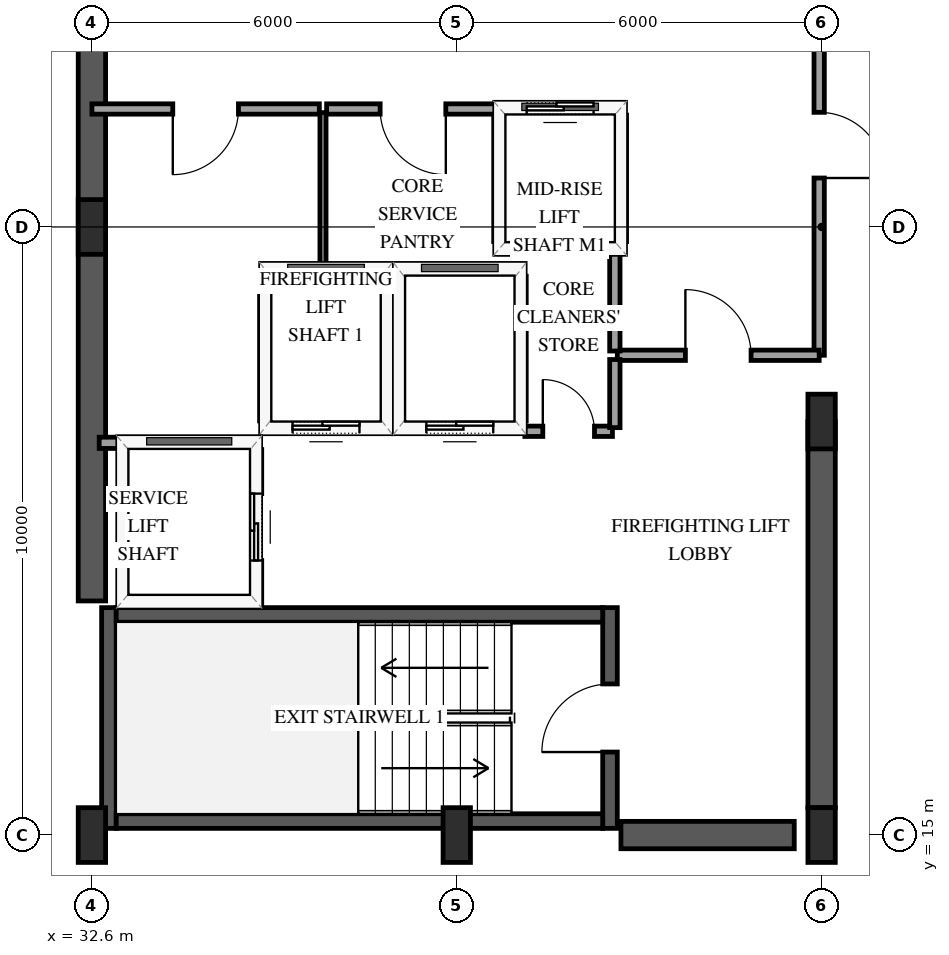
"""IFC4 building model, lengths in metres.
Left out: names, types, materials, properties, quantities, classifications, styles, units other than length and angle.
Written with IfcOpenShell. Run it as: python <this file> out.ifc"""

import sys

from ifc_helpers import new_model, si_unit, direction, frame, frame_2d, origin, origin_2d, place, context, subcontext, project, spatial, rectangle, extrude, element, fill, save


model = new_model("IFC4")
c1 = context("Model", 3, precision=1e-05, world=origin(), true_north=direction((0.0, 1.0)))
c2 = subcontext(c1, "Body", "Model", "MODEL_VIEW")
j1 = project(units=[si_unit("LENGTHUNIT", "METRE"), si_unit("PLANEANGLEUNIT", "RADIAN")], contexts=[c1])
p1 = place(None, origin())
s1 = spatial("IfcSite", under=j1, at=p1, CompositionType="ELEMENT")
p2 = place(p1, origin())
s2 = spatial("IfcBuilding", under=s1, at=p2, CompositionType="ELEMENT")
p3 = place(p2, frame((0.0, 0.0, 194.2)))
s3 = spatial("IfcBuildingStorey", under=s2, at=p3, CompositionType="ELEMENT", Elevation=194.2)
p4 = place(p3, frame((32.88, 15.11, 0.0), z_axis=(0.0, 0.0, 1.0), x_axis=(0.0, 1.0, 0.0)))
e1 = element("IfcWall", 1, at=p4, inside=s3, PredefinedType="SHEAR", context=c2, shape_type="SweptSolid", body=[
    extrude(rectangle(XDim=3.63, YDim=0.24, at=frame_2d((1.815, 0.0))), origin(), (0.0, 0.0, 1.0), 3.6),
])
p5 = place(p3, frame((41.12, 15.11, 0.0), z_axis=(0.0, 0.0, 1.0), x_axis=(0.0, 1.0, 0.0)))
e2 = element("IfcWall", 2, at=p5, inside=s3, PredefinedType="SHEAR", context=c2, shape_type="SweptSolid", body=[
    extrude(rectangle(XDim=3.63, YDim=0.24, at=frame_2d((1.815, 0.0))), origin(), (0.0, 0.0, 1.0), 3.6),
])
p6 = place(p5, frame((1.255, 0.0, 0.0)))
e3 = element("IfcOpeningElement", 3, at=p6, cuts=e2, PredefinedType="OPENING", context=c2, shape_type="SweptSolid", body=[
    extrude(rectangle(XDim=1.12, YDim=2.15, at=frame_2d((0.56, 1.075))), frame((0.0, 0.13, 0.0), z_axis=(0.0, -1.0, 0.0), x_axis=(1.0, 0.0, 0.0)), (0.0, 0.0, 1.0), 0.26),
])
for number, where, z_axis, x_axis in (
    (4, (33.0, 15.23, 0.0), (0.0, 0.0, 1.0), (1.0, 0.0, 0.0)),
    (5, (33.0, 18.62, 0.0), (0.0, 0.0, 1.0), (1.0, 0.0, 0.0)),
):
    element("IfcWall", number, at=place(p3, frame(where, z_axis=z_axis, x_axis=x_axis)), inside=s3, PredefinedType="SHEAR", context=c2, shape_type="SweptSolid", body=[
        extrude(rectangle(XDim=8.0, YDim=0.24, at=frame_2d((4.0, 0.0))), origin(), (0.0, 0.0, 1.0), 3.6),
    ])
p7 = place(p3, frame((32.6, 18.85, 0.0), z_axis=(0.0, 0.0, 1.0), x_axis=(0.0, 1.0, 0.0)))
e6 = element("IfcWall", 6, at=p7, inside=s3, PredefinedType="SHEAR", context=c2, shape_type="SweptSolid", body=[
    extrude(rectangle(XDim=12.3, YDim=0.45, at=frame_2d((6.15, 0.0))), origin(), (0.0, 0.0, 1.0), 3.6),
])
p8 = place(p3, frame((41.3, 15.0, 0.0), z_axis=(0.0, 0.0, 1.0), x_axis=(1.0, 0.0, 0.0)))
e7 = element("IfcWall", 7, at=p8, inside=s3, PredefinedType="SHEAR", context=c2, shape_type="SweptSolid", body=[
    extrude(rectangle(XDim=2.85, YDim=0.45, at=frame_2d((1.425, 0.0))), origin(), (0.0, 0.0, 1.0), 3.6),
])
p9 = place(p3, frame((44.6, 15.45, 0.0), z_axis=(0.0, 0.0, 1.0), x_axis=(0.0, 1.0, 0.0)))
e8 = element("IfcWall", 8, at=p9, inside=s3, PredefinedType="SHEAR", context=c2, shape_type="SweptSolid", body=[
    extrude(rectangle(XDim=6.35, YDim=0.45, at=frame_2d((3.175, 0.0))), origin(), (0.0, 0.0, 1.0), 3.6),
])
for number, where, z_axis, x_axis in (
    (9, (32.6, 15.0, 0.0), (0.0, 0.0, 1.0), (1.0, 0.0, 0.0)),
    (10, (32.6, 25.0, 0.0), (0.0, 0.0, 1.0), (1.0, 0.0, 0.0)),
    (11, (38.6, 15.0, 0.0), (0.0, 0.0, 1.0), (1.0, 0.0, 0.0)),
    (12, (44.6, 15.0, 0.0), (0.0, 0.0, 1.0), (1.0, 0.0, 0.0)),
    (13, (44.6, 21.8, 0.0), (0.0, 0.0, 1.0), (1.0, 0.0, 0.0)),
):
    element("IfcColumn", number, at=place(p3, frame(where, z_axis=z_axis, x_axis=x_axis)), inside=s3, PredefinedType="PILASTER", context=c2, shape_type="SweptSolid", body=[
        extrude(rectangle(XDim=0.45, YDim=0.9, at=origin_2d()), origin(), (0.0, 0.0, 1.0), 3.6),
    ])
p10 = place(p3, frame((35.45, 21.7, 0.0), z_axis=(0.0, 0.0, 1.0), x_axis=(1.0, 0.0, 0.0)))
e14 = element("IfcWall", 14, at=p10, inside=s3, PredefinedType="SOLIDWALL", context=c2, shape_type="SweptSolid", body=[
    extrude(rectangle(XDim=2.0, YDim=0.185, at=frame_2d((1.0, 0.0))), origin(), (0.0, 0.0, 1.0), 3.3),
])
p11 = place(p10, frame((0.45, 0.0, 0.0)))
e15 = element("IfcOpeningElement", 15, at=p11, cuts=e14, PredefinedType="OPENING", context=c2, shape_type="SweptSolid", body=[
    extrude(rectangle(XDim=1.1, YDim=2.15, at=frame_2d((0.55, 1.075))), frame((0.0, 0.103, 0.0), z_axis=(0.0, -1.0, 0.0), x_axis=(1.0, 0.0, 0.0)), (0.0, 0.0, 1.0), 0.205),
])
p12 = place(p3, frame((35.45, 24.3, 0.0), z_axis=(0.0, 0.0, 1.0), x_axis=(1.0, 0.0, 0.0)))
e16 = element("IfcWall", 16, at=p12, inside=s3, PredefinedType="SOLIDWALL", context=c2, shape_type="SweptSolid", body=[
    extrude(rectangle(XDim=2.0, YDim=0.185, at=frame_2d((1.0, 0.0))), origin(), (0.0, 0.0, 1.0), 3.3),
])
for number, where, z_axis, x_axis in (
    (17, (35.45, 21.81, 0.0), (0.0, 0.0, 1.0), (0.0, 1.0, 0.0)),
    (18, (37.45, 21.81, 0.0), (0.0, 0.0, 1.0), (0.0, 1.0, 0.0)),
):
    element("IfcWall", number, at=place(p3, frame(where, z_axis=z_axis, x_axis=x_axis)), inside=s3, PredefinedType="SOLIDWALL", context=c2, shape_type="SweptSolid", body=[
        extrude(rectangle(XDim=2.38, YDim=0.185, at=frame_2d((1.19, 0.0))), origin(), (0.0, 0.0, 1.0), 3.3),
    ])
p13 = place(p3, frame((37.65, 21.7, 0.0), z_axis=(0.0, 0.0, 1.0), x_axis=(1.0, 0.0, 0.0)))
e19 = element("IfcWall", 19, at=p13, inside=s3, PredefinedType="SOLIDWALL", context=c2, shape_type="SweptSolid", body=[
    extrude(rectangle(XDim=2.0, YDim=0.185, at=frame_2d((1.0, 0.0))), origin(), (0.0, 0.0, 1.0), 3.3),
])
p14 = place(p13, frame((0.45, 0.0, 0.0)))
e20 = element("IfcOpeningElement", 20, at=p14, cuts=e19, PredefinedType="OPENING", context=c2, shape_type="SweptSolid", body=[
    extrude(rectangle(XDim=1.1, YDim=2.15, at=frame_2d((0.55, 1.075))), frame((0.0, 0.103, 0.0), z_axis=(0.0, -1.0, 0.0), x_axis=(1.0, 0.0, 0.0)), (0.0, 0.0, 1.0), 0.205),
])
p15 = place(p3, frame((37.65, 24.3, 0.0), z_axis=(0.0, 0.0, 1.0), x_axis=(1.0, 0.0, 0.0)))
e21 = element("IfcWall", 21, at=p15, inside=s3, PredefinedType="SOLIDWALL", context=c2, shape_type="SweptSolid", body=[
    extrude(rectangle(XDim=2.0, YDim=0.185, at=frame_2d((1.0, 0.0))), origin(), (0.0, 0.0, 1.0), 3.3),
])
p16 = place(p3, frame((39.65, 21.81, 0.0), z_axis=(0.0, 0.0, 1.0), x_axis=(0.0, 1.0, 0.0)))
e22 = element("IfcWall", 22, at=p16, inside=s3, PredefinedType="SOLIDWALL", context=c2, shape_type="SweptSolid", body=[
    extrude(rectangle(XDim=2.38, YDim=0.185, at=frame_2d((1.19, 0.0))), origin(), (0.0, 0.0, 1.0), 3.3),
])
p17 = place(p3, frame((32.72, 21.45, 0.0), z_axis=(0.0, 0.0, 1.0), x_axis=(1.0, 0.0, 0.0)))
e23 = element("IfcWall", 23, at=p17, inside=s3, PredefinedType="SOLIDWALL", context=c2, shape_type="SweptSolid", body=[
    extrude(rectangle(XDim=2.58, YDim=0.185, at=frame_2d((1.29, 0.0))), origin(), (0.0, 0.0, 1.0), 3.3),
])
p18 = place(p3, frame((35.3, 18.79, 0.0), z_axis=(0.0, 0.0, 1.0), x_axis=(0.0, 1.0, 0.0)))
e24 = element("IfcWall", 24, at=p18, inside=s3, PredefinedType="SOLIDWALL", context=c2, shape_type="SweptSolid", body=[
    extrude(rectangle(XDim=2.55, YDim=0.185, at=frame_2d((1.275, 0.0))), origin(), (0.0, 0.0, 1.0), 3.3),
])
p19 = place(p18, frame((0.725, 0.0, 0.0)))
e25 = element("IfcOpeningElement", 25, at=p19, cuts=e24, PredefinedType="OPENING", context=c2, shape_type="SweptSolid", body=[
    extrude(rectangle(XDim=1.1, YDim=2.15, at=frame_2d((0.55, 1.075))), frame((0.0, 0.103, 0.0), z_axis=(0.0, -1.0, 0.0), x_axis=(1.0, 0.0, 0.0)), (0.0, 0.0, 1.0), 0.205),
])
p20 = place(p3, frame((39.3, 24.65, 0.0), z_axis=(0.0, 0.0, 1.0), x_axis=(1.0, 0.0, 0.0)))
e26 = element("IfcWall", 26, at=p20, inside=s3, PredefinedType="SOLIDWALL", context=c2, shape_type="SweptSolid", body=[
    extrude(rectangle(XDim=2.0, YDim=0.185, at=frame_2d((1.0, 0.0))), origin(), (0.0, 0.0, 1.0), 3.3),
])
p21 = place(p3, frame((39.3, 26.95, 0.0), z_axis=(0.0, 0.0, 1.0), x_axis=(1.0, 0.0, 0.0)))
e27 = element("IfcWall", 27, at=p21, inside=s3, PredefinedType="SOLIDWALL", context=c2, shape_type="SweptSolid", body=[
    extrude(rectangle(XDim=2.0, YDim=0.185, at=frame_2d((1.0, 0.0))), origin(), (0.0, 0.0, 1.0), 3.3),
])
p22 = place(p21, frame((0.45, 0.0, 0.0)))
e28 = element("IfcOpeningElement", 28, at=p22, cuts=e27, PredefinedType="OPENING", context=c2, shape_type="SweptSolid", body=[
    extrude(rectangle(XDim=1.1, YDim=2.15, at=frame_2d((0.55, 1.075))), frame((0.0, 0.103, 0.0), z_axis=(0.0, -1.0, 0.0), x_axis=(1.0, 0.0, 0.0)), (0.0, 0.0, 1.0), 0.205),
])
for number, where, z_axis, x_axis in (
    (29, (39.3, 24.76, 0.0), (0.0, 0.0, 1.0), (0.0, 1.0, 0.0)),
    (30, (41.3, 24.76, 0.0), (0.0, 0.0, 1.0), (0.0, 1.0, 0.0)),
):
    element("IfcWall", number, at=place(p3, frame(where, z_axis=z_axis, x_axis=x_axis)), inside=s3, PredefinedType="SOLIDWALL", context=c2, shape_type="SweptSolid", body=[
        extrude(rectangle(XDim=2.08, YDim=0.185, at=frame_2d((1.04, 0.0))), origin(), (0.0, 0.0, 1.0), 3.3),
    ])
p23 = place(p3, frame((44.56, 29.8, 0.0), z_axis=(0.0, 0.0, 1.0), x_axis=(0.0, -1.0, 0.0)))
e31 = element("IfcWall", 31, at=p23, inside=s3, PredefinedType="PARTITIONING", context=c2, shape_type="SweptSolid", body=[
    extrude(rectangle(XDim=6.91, YDim=0.17, at=frame_2d((3.455, 0.0))), origin(), (0.0, 0.0, 1.0), 2.34),
])
p24 = place(p23, frame((2.915, 0.0, 0.0)))
e32 = element("IfcOpeningElement", 32, at=p24, cuts=e31, PredefinedType="OPENING", context=c2, shape_type="SweptSolid", body=[
    extrude(rectangle(XDim=1.08, YDim=2.15, at=frame_2d((0.54, 1.075))), frame((0.0, 0.095, 0.0), z_axis=(0.0, -1.0, 0.0), x_axis=(1.0, 0.0, 0.0)), (0.0, 0.0, 1.0), 0.19),
])
p25 = place(p3, frame((36.34, 26.94, 0.0), z_axis=(0.0, 0.0, 1.0), x_axis=(-1.0, 0.0, 0.0)))
e33 = element("IfcWall", 33, at=p25, inside=s3, PredefinedType="PARTITIONING", context=c2, shape_type="SweptSolid", body=[
    extrude(rectangle(XDim=3.74, YDim=0.17, at=frame_2d((1.87, 0.0))), origin(), (0.0, 0.0, 1.0), 3.3),
])
p26 = place(p25, frame((1.33, 0.0, 0.0)))
e34 = element("IfcOpeningElement", 34, at=p26, cuts=e33, PredefinedType="OPENING", context=c2, shape_type="SweptSolid", body=[
    extrude(rectangle(XDim=1.08, YDim=2.15, at=frame_2d((0.54, 1.075))), frame((0.0, 0.095, 0.0), z_axis=(0.0, -1.0, 0.0), x_axis=(1.0, 0.0, 0.0)), (0.0, 0.0, 1.0), 0.19),
])
p27 = place(p3, frame((41.24, 22.89, 0.0), z_axis=(0.0, 0.0, 1.0), x_axis=(1.0, 0.0, 0.0)))
e35 = element("IfcWall", 35, at=p27, inside=s3, PredefinedType="PARTITIONING", context=c2, shape_type="SweptSolid", body=[
    extrude(rectangle(XDim=3.32, YDim=0.17, at=frame_2d((1.66, 0.0))), origin(), (0.0, 0.0, 1.0), 3.3),
])
p28 = place(p27, frame((1.12, 0.0, 0.0)))
e36 = element("IfcOpeningElement", 36, at=p28, cuts=e35, PredefinedType="OPENING", context=c2, shape_type="SweptSolid", body=[
    extrude(rectangle(XDim=1.08, YDim=2.15, at=frame_2d((0.54, 1.075))), frame((0.0, 0.095, 0.0), z_axis=(0.0, -1.0, 0.0), x_axis=(1.0, 0.0, 0.0)), (0.0, 0.0, 1.0), 0.19),
])
p29 = place(p3, frame((39.3, 26.94, 0.0), z_axis=(0.0, 0.0, 1.0), x_axis=(-1.0, 0.0, 0.0)))
e37 = element("IfcWall", 37, at=p29, inside=s3, PredefinedType="PARTITIONING", context=c2, shape_type="SweptSolid", body=[
    extrude(rectangle(XDim=2.84, YDim=0.17, at=frame_2d((1.42, 0.0))), origin(), (0.0, 0.0, 1.0), 3.3),
])
p30 = place(p29, frame((0.88, 0.0, 0.0)))
e38 = element("IfcOpeningElement", 38, at=p30, cuts=e37, PredefinedType="OPENING", context=c2, shape_type="SweptSolid", body=[
    extrude(rectangle(XDim=1.08, YDim=2.15, at=frame_2d((0.54, 1.075))), frame((0.0, 0.095, 0.0), z_axis=(0.0, -1.0, 0.0), x_axis=(1.0, 0.0, 0.0)), (0.0, 0.0, 1.0), 0.19),
])
p31 = place(p3, frame((36.4, 26.88, 0.0), z_axis=(0.0, 0.0, 1.0), x_axis=(0.0, -1.0, 0.0)))
e39 = element("IfcWall", 39, at=p31, inside=s3, PredefinedType="PARTITIONING", context=c2, shape_type="SweptSolid", body=[
    extrude(rectangle(XDim=2.58, YDim=0.1, at=frame_2d((1.29, 0.0))), origin(), (0.0, 0.0, 1.0), 3.3),
])
p32 = place(p3, frame((41.2, 22.96, 0.0), z_axis=(0.0, 0.0, 1.0), x_axis=(0.0, 1.0, 0.0)))
e40 = element("IfcWall", 40, at=p32, inside=s3, PredefinedType="PARTITIONING", context=c2, shape_type="SweptSolid", body=[
    extrude(rectangle(XDim=1.69, YDim=0.17, at=frame_2d((0.845, 0.0))), origin(), (0.0, 0.0, 1.0), 3.3),
])
p33 = place(p3, frame((39.72, 21.64, 0.0), z_axis=(0.0, 0.0, 1.0), x_axis=(1.0, 0.0, 0.0)))
e41 = element("IfcWall", 41, at=p33, inside=s3, PredefinedType="PARTITIONING", context=c2, shape_type="SweptSolid", body=[
    extrude(rectangle(XDim=1.44, YDim=0.17, at=frame_2d((0.72, 0.0))), origin(), (0.0, 0.0, 1.0), 3.3),
])
p34 = place(p33, frame((0.295, 0.0, 0.0)))
e42 = element("IfcOpeningElement", 42, at=p34, cuts=e41, PredefinedType="OPENING", context=c2, shape_type="SweptSolid", body=[
    extrude(rectangle(XDim=0.85, YDim=2.1, at=frame_2d((0.425, 1.05))), frame((0.0, 0.095, 0.0), z_axis=(0.0, -1.0, 0.0), x_axis=(1.0, 0.0, 0.0)), (0.0, 0.0, 1.0), 0.19),
])
p35 = place(p3, frame((41.2, 21.7, 0.0), z_axis=(0.0, 0.0, 1.0), x_axis=(0.0, 1.0, 0.0)))
e43 = element("IfcWall", 43, at=p35, inside=s3, PredefinedType="PARTITIONING", context=c2, shape_type="SweptSolid", body=[
    extrude(rectangle(XDim=1.12, YDim=0.17, at=frame_2d((0.56, 0.0))), origin(), (0.0, 0.0, 1.0), 3.3),
])
p36 = place(p11, origin())
e44 = element("IfcDoor", 44, at=p36, inside=s3, OperationType="SLIDING_TO_LEFT", PredefinedType="DOOR", context=c2, shape_type="SweptSolid", body=[
    extrude(rectangle(XDim=1.1, YDim=2.15, at=frame_2d((0.55, 1.075))), frame((0.0, 0.025, 0.0), z_axis=(0.0, -1.0, 0.0), x_axis=(1.0, 0.0, 0.0)), (0.0, 0.0, 1.0), 0.05),
])
fill(e15, e44)
p37 = place(p14, origin())
e45 = element("IfcDoor", 45, at=p37, inside=s3, OperationType="SLIDING_TO_LEFT", PredefinedType="DOOR", context=c2, shape_type="SweptSolid", body=[
    extrude(rectangle(XDim=1.1, YDim=2.15, at=frame_2d((0.55, 1.075))), frame((0.0, 0.025, 0.0), z_axis=(0.0, -1.0, 0.0), x_axis=(1.0, 0.0, 0.0)), (0.0, 0.0, 1.0), 0.05),
])
fill(e20, e45)
p38 = place(p19, origin())
e46 = element("IfcDoor", 46, at=p38, inside=s3, OperationType="SLIDING_TO_LEFT", PredefinedType="DOOR", context=c2, shape_type="SweptSolid", body=[
    extrude(rectangle(XDim=1.1, YDim=2.15, at=frame_2d((0.55, 1.075))), frame((0.0, 0.025, 0.0), z_axis=(0.0, -1.0, 0.0), x_axis=(1.0, 0.0, 0.0)), (0.0, 0.0, 1.0), 0.05),
])
fill(e25, e46)
p39 = place(p22, origin())
e47 = element("IfcDoor", 47, at=p39, inside=s3, OperationType="SLIDING_TO_LEFT", PredefinedType="DOOR", context=c2, shape_type="SweptSolid", body=[
    extrude(rectangle(XDim=1.1, YDim=2.15, at=frame_2d((0.55, 1.075))), frame((0.0, 0.025, 0.0), z_axis=(0.0, -1.0, 0.0), x_axis=(1.0, 0.0, 0.0)), (0.0, 0.0, 1.0), 0.05),
])
fill(e28, e47)
p40 = place(p6, origin())
e48 = element("IfcDoor", 48, at=p40, inside=s3, OperationType="SINGLE_SWING_LEFT", PredefinedType="DOOR", context=c2, shape_type="SweptSolid", body=[
    extrude(rectangle(XDim=1.12, YDim=2.15, at=frame_2d((0.56, 1.075))), frame((0.0, 0.025, 0.0), z_axis=(0.0, -1.0, 0.0), x_axis=(1.0, 0.0, 0.0)), (0.0, 0.0, 1.0), 0.05),
])
fill(e3, e48)
p41 = place(p24, origin())
e49 = element("IfcDoor", 49, at=p41, inside=s3, OperationType="SINGLE_SWING_RIGHT", PredefinedType="DOOR", context=c2, shape_type="SweptSolid", body=[
    extrude(rectangle(XDim=1.08, YDim=2.15, at=frame_2d((0.54, 1.075))), frame((0.0, 0.025, 0.0), z_axis=(0.0, -1.0, 0.0), x_axis=(1.0, 0.0, 0.0)), (0.0, 0.0, 1.0), 0.05),
])
fill(e32, e49)
p42 = place(p26, origin())
e50 = element("IfcDoor", 50, at=p42, inside=s3, OperationType="SINGLE_SWING_RIGHT", PredefinedType="DOOR", context=c2, shape_type="SweptSolid", body=[
    extrude(rectangle(XDim=1.08, YDim=2.15, at=frame_2d((0.54, 1.075))), frame((0.0, 0.025, 0.0), z_axis=(0.0, -1.0, 0.0), x_axis=(1.0, 0.0, 0.0)), (0.0, 0.0, 1.0), 0.05),
])
fill(e34, e50)
p43 = place(p28, origin())
e51 = element("IfcDoor", 51, at=p43, inside=s3, OperationType="SINGLE_SWING_LEFT", PredefinedType="DOOR", context=c2, shape_type="SweptSolid", body=[
    extrude(rectangle(XDim=1.08, YDim=2.15, at=frame_2d((0.54, 1.075))), frame((0.0, 0.025, 0.0), z_axis=(0.0, -1.0, 0.0), x_axis=(1.0, 0.0, 0.0)), (0.0, 0.0, 1.0), 0.05),
])
fill(e36, e51)
p44 = place(p30, origin())
e52 = element("IfcDoor", 52, at=p44, inside=s3, OperationType="SINGLE_SWING_LEFT", PredefinedType="DOOR", context=c2, shape_type="SweptSolid", body=[
    extrude(rectangle(XDim=1.08, YDim=2.15, at=frame_2d((0.54, 1.075))), frame((0.0, 0.025, 0.0), z_axis=(0.0, -1.0, 0.0), x_axis=(1.0, 0.0, 0.0)), (0.0, 0.0, 1.0), 0.05),
])
fill(e38, e52)
p45 = place(p34, origin())
e53 = element("IfcDoor", 53, at=p45, inside=s3, OperationType="SINGLE_SWING_LEFT", PredefinedType="DOOR", context=c2, shape_type="SweptSolid", body=[
    extrude(rectangle(XDim=0.85, YDim=2.1, at=frame_2d((0.425, 1.05))), frame((0.0, 0.025, 0.0), z_axis=(0.0, -1.0, 0.0), x_axis=(1.0, 0.0, 0.0)), (0.0, 0.0, 1.0), 0.05),
])
fill(e42, e53)
save(model, sys.argv[1])
